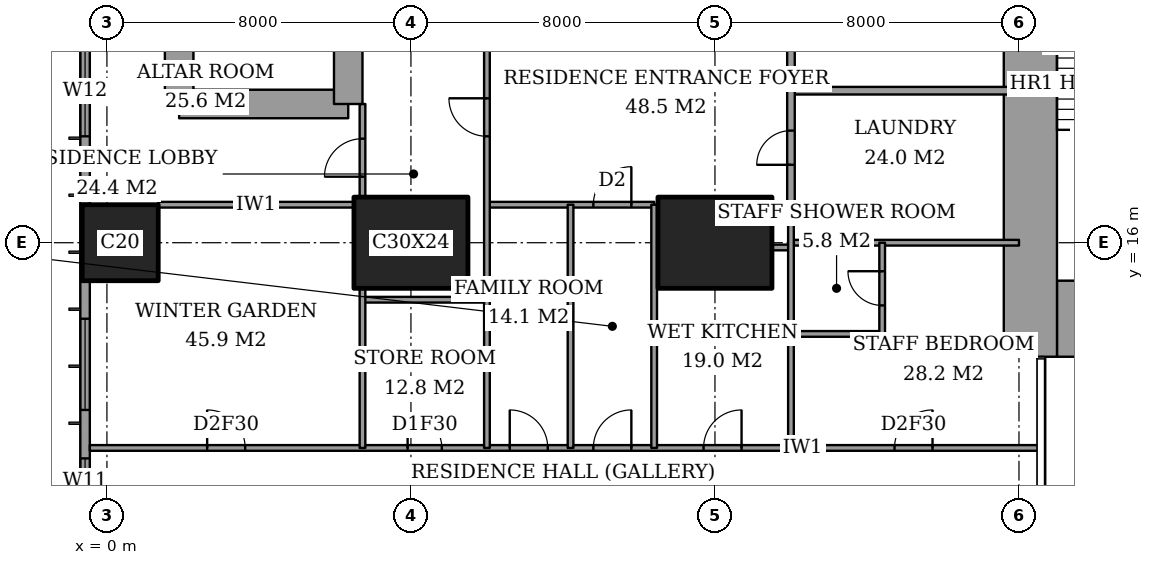
"""IFC4 building model, lengths in metres.
Left out: names, types, materials, properties, quantities, classifications, styles, units other than length and angle.
Written with IfcOpenShell. Run it as: python <this file> out.ifc"""

import sys

from ifc_helpers import new_model, si_unit, direction, frame, frame_2d, origin, origin_2d, place, context, subcontext, project, spatial, rectangle, extrude, element, fill, save


model = new_model("IFC4")
c1 = context("Model", 3, precision=1e-05, world=origin(), true_north=direction((0.0, 1.0)))
c2 = subcontext(c1, "Body", "Model", "MODEL_VIEW")
j1 = project(units=[si_unit("LENGTHUNIT", "METRE"), si_unit("PLANEANGLEUNIT", "RADIAN")], contexts=[c1])
p1 = place(None, origin())
s1 = spatial("IfcSite", under=j1, at=p1, CompositionType="ELEMENT")
p2 = place(p1, origin())
s2 = spatial("IfcBuilding", under=s1, at=p2, CompositionType="ELEMENT")
p3 = place(p2, frame((0.0, 0.0, 128.6)))
s3 = spatial("IfcBuildingStorey", under=s2, at=p3, CompositionType="ELEMENT", Elevation=128.6)
p4 = place(p3, frame((0.35, 16.0, 0.0), z_axis=(0.0, 0.0, 1.0), x_axis=(1.0, 0.0, 0.0)))
e1 = element("IfcColumn", 1, at=p4, inside=s3, PredefinedType="COLUMN", context=c2, shape_type="SweptSolid", body=[
    extrude(rectangle(XDim=2.0, YDim=2.0, at=origin_2d()), origin(), (0.0, 0.0, 1.0), 3.6),
])
for number, where, z_axis, x_axis in (
    (2, (8.0, 16.0, 0.0), (0.0, 0.0, 1.0), (1.0, 0.0, 0.0)),
    (3, (16.0, 16.0, 0.0), (0.0, 0.0, 1.0), (1.0, 0.0, 0.0)),
):
    element("IfcColumn", number, at=place(p3, frame(where, z_axis=z_axis, x_axis=x_axis)), inside=s3, PredefinedType="COLUMN", context=c2, shape_type="SweptSolid", body=[
        extrude(rectangle(XDim=3.0, YDim=2.4, at=origin_2d()), origin(), (0.0, 0.0, 1.0), 3.6),
    ])
p5 = place(p3, frame((25.0, 14.0, 0.0), z_axis=(0.0, 0.0, 1.0), x_axis=(1.0, 0.0, 0.0)))
e4 = element("IfcWall", 4, at=p5, inside=s3, PredefinedType="SHEAR", context=c2, shape_type="SweptSolid", body=[
    extrude(rectangle(XDim=3.15, YDim=2.0, at=frame_2d((1.575, 0.0))), origin(), (0.0, 0.0, 1.0), 3.6),
])
p6 = place(p3, frame((24.3, 13.0, 0.0), z_axis=(0.0, 0.0, 1.0), x_axis=(0.0, 1.0, 0.0)))
e5 = element("IfcWall", 5, at=p6, inside=s3, PredefinedType="SHEAR", context=c2, shape_type="SweptSolid", body=[
    extrude(rectangle(XDim=10.15, YDim=1.4, at=frame_2d((5.075, 0.0))), origin(), (0.0, 0.0, 1.0), 3.6),
])
p7 = place(p3, frame((1.9, 19.65, 0.0), z_axis=(0.0, 0.0, 1.0), x_axis=(1.0, 0.0, 0.0)))
e6 = element("IfcWall", 6, at=p7, inside=s3, PredefinedType="SHEAR", context=c2, shape_type="SweptSolid", body=[
    extrude(rectangle(XDim=4.45, YDim=0.75, at=frame_2d((2.225, 0.0))), origin(), (0.0, 0.0, 1.0), 3.6),
])
p8 = place(p3, frame((6.35, 19.65, 0.0), z_axis=(0.0, 0.0, 1.0), x_axis=(0.0, 1.0, 0.0)))
e7 = element("IfcWall", 7, at=p8, inside=s3, PredefinedType="SHEAR", context=c2, shape_type="SweptSolid", body=[
    extrude(rectangle(XDim=8.7, YDim=0.75, at=frame_2d((4.35, 0.0))), origin(), (0.0, 0.0, 1.0), 3.6),
])
p9 = place(p8, frame((6.725, 0.0, 0.0)))
e8 = element("IfcOpeningElement", 8, at=p9, cuts=e7, PredefinedType="OPENING", context=c2, shape_type="SweptSolid", body=[
    extrude(rectangle(XDim=1.0, YDim=2.1, at=frame_2d((0.5, 1.05))), frame((0.0, 0.385, 0.0), z_axis=(0.0, -1.0, 0.0), x_axis=(1.0, 0.0, 0.0)), (0.0, 0.0, 1.0), 0.77),
])
p10 = place(p3, frame((1.9, 28.35, 0.0), z_axis=(0.0, 0.0, 1.0), x_axis=(0.0, -1.0, 0.0)))
e9 = element("IfcWall", 9, at=p10, inside=s3, PredefinedType="SHEAR", context=c2, shape_type="SweptSolid", body=[
    extrude(rectangle(XDim=8.7, YDim=0.75, at=frame_2d((4.35, 0.0))), origin(), (0.0, 0.0, 1.0), 3.6),
])
p11 = place(p3, frame((-0.575, 44.825, 0.0), z_axis=(0.0, 0.0, 1.0), x_axis=(0.0, -1.0, 0.0)))
e10 = element("IfcWall", 10, at=p11, inside=s3, PredefinedType="SOLIDWALL", context=c2, shape_type="SweptSolid", body=[
    extrude(rectangle(XDim=41.65, YDim=0.25, at=frame_2d((20.825, 0.0))), origin(), (0.0, 0.0, 1.0), 3.6),
])
p12 = place(p11, frame((0.775, 0.0, 0.4)))
e11 = element("IfcOpeningElement", 11, at=p12, cuts=e10, PredefinedType="OPENING", context=c2, shape_type="SweptSolid", body=[
    extrude(rectangle(XDim=2.4, YDim=2.2, at=frame_2d((1.2, 1.1))), frame((0.0, 0.135, 0.0), z_axis=(0.0, -1.0, 0.0), x_axis=(1.0, 0.0, 0.0)), (0.0, 0.0, 1.0), 0.27),
])
p13 = place(p11, frame((6.2, 0.0, 0.4)))
e12 = element("IfcOpeningElement", 12, at=p13, cuts=e10, PredefinedType="OPENING", context=c2, shape_type="SweptSolid", body=[
    extrude(rectangle(XDim=1.2, YDim=2.2, at=frame_2d((0.6, 1.1))), frame((0.0, 0.135, 0.0), z_axis=(0.0, -1.0, 0.0), x_axis=(1.0, 0.0, 0.0)), (0.0, 0.0, 1.0), 0.27),
])
p14 = place(p11, frame((8.525, 0.0, 0.4)))
e13 = element("IfcOpeningElement", 13, at=p14, cuts=e10, PredefinedType="OPENING", context=c2, shape_type="SweptSolid", body=[
    extrude(rectangle(XDim=2.4, YDim=2.2, at=frame_2d((1.2, 1.1))), frame((0.0, 0.135, 0.0), z_axis=(0.0, -1.0, 0.0), x_axis=(1.0, 0.0, 0.0)), (0.0, 0.0, 1.0), 0.27),
])
p15 = place(p11, frame((15.625, 0.0, 0.4)))
e14 = element("IfcOpeningElement", 14, at=p15, cuts=e10, PredefinedType="OPENING", context=c2, shape_type="SweptSolid", body=[
    extrude(rectangle(XDim=2.4, YDim=2.2, at=frame_2d((1.2, 1.1))), frame((0.0, 0.135, 0.0), z_axis=(0.0, -1.0, 0.0), x_axis=(1.0, 0.0, 0.0)), (0.0, 0.0, 1.0), 0.27),
])
p16 = place(p11, frame((23.625, 0.0, 0.4)))
e15 = element("IfcOpeningElement", 15, at=p16, cuts=e10, PredefinedType="OPENING", context=c2, shape_type="SweptSolid", body=[
    extrude(rectangle(XDim=2.4, YDim=2.2, at=frame_2d((1.2, 1.1))), frame((0.0, 0.135, 0.0), z_axis=(0.0, -1.0, 0.0), x_axis=(1.0, 0.0, 0.0)), (0.0, 0.0, 1.0), 0.27),
])
p17 = place(p11, frame((30.825, 0.0, 0.4)))
e16 = element("IfcOpeningElement", 16, at=p17, cuts=e10, PredefinedType="OPENING", context=c2, shape_type="SweptSolid", body=[
    extrude(rectangle(XDim=2.4, YDim=2.2, at=frame_2d((1.2, 1.1))), frame((0.0, 0.135, 0.0), z_axis=(0.0, -1.0, 0.0), x_axis=(1.0, 0.0, 0.0)), (0.0, 0.0, 1.0), 0.27),
])
p18 = place(p11, frame((34.5, 0.0, 0.4)))
e17 = element("IfcOpeningElement", 17, at=p18, cuts=e10, PredefinedType="OPENING", context=c2, shape_type="SweptSolid", body=[
    extrude(rectangle(XDim=1.2, YDim=2.2, at=frame_2d((0.6, 1.1))), frame((0.0, 0.135, 0.0), z_axis=(0.0, -1.0, 0.0), x_axis=(1.0, 0.0, 0.0)), (0.0, 0.0, 1.0), 0.27),
])
p19 = place(p11, frame((38.475, 0.0, 0.4)))
e18 = element("IfcOpeningElement", 18, at=p19, cuts=e10, PredefinedType="OPENING", context=c2, shape_type="SweptSolid", body=[
    extrude(rectangle(XDim=2.4, YDim=2.2, at=frame_2d((1.2, 1.1))), frame((0.0, 0.135, 0.0), z_axis=(0.0, -1.0, 0.0), x_axis=(1.0, 0.0, 0.0)), (0.0, 0.0, 1.0), 0.27),
])
p20 = place(p3, frame((-0.45, 10.6, 0.0), z_axis=(0.0, 0.0, 1.0), x_axis=(1.0, 0.0, 0.0)))
e19 = element("IfcWall", 19, at=p20, inside=s3, PredefinedType="PARTITIONING", context=c2, shape_type="SweptSolid", body=[
    extrude(rectangle(XDim=25.011, YDim=0.15, at=frame_2d((12.505, 0.0))), origin(), (0.0, 0.0, 1.0), 3.35),
])
p21 = place(p20, frame((13.25, 0.0, 0.0)))
e20 = element("IfcOpeningElement", 20, at=p21, cuts=e19, PredefinedType="OPENING", context=c2, shape_type="SweptSolid", body=[
    extrude(rectangle(XDim=1.0, YDim=2.1, at=frame_2d((0.5, 1.05))), frame((0.0, 0.085, 0.0), z_axis=(0.0, -1.0, 0.0), x_axis=(1.0, 0.0, 0.0)), (0.0, 0.0, 1.0), 0.17),
])
p22 = place(p20, frame((3.087, 0.0, 0.0)))
e21 = element("IfcOpeningElement", 21, at=p22, cuts=e19, PredefinedType="OPENING", context=c2, shape_type="SweptSolid", body=[
    extrude(rectangle(XDim=1.0, YDim=2.1, at=frame_2d((0.5, 1.05))), frame((0.0, 0.085, 0.0), z_axis=(0.0, -1.0, 0.0), x_axis=(1.0, 0.0, 0.0)), (0.0, 0.0, 1.0), 0.17),
])
p23 = place(p20, frame((8.363, 0.0, 0.0)))
e22 = element("IfcOpeningElement", 22, at=p23, cuts=e19, PredefinedType="OPENING", context=c2, shape_type="SweptSolid", body=[
    extrude(rectangle(XDim=0.9, YDim=2.1, at=frame_2d((0.45, 1.05))), frame((0.0, 0.085, 0.0), z_axis=(0.0, -1.0, 0.0), x_axis=(1.0, 0.0, 0.0)), (0.0, 0.0, 1.0), 0.17),
])
p24 = place(p20, frame((11.05, 0.0, 0.0)))
e23 = element("IfcOpeningElement", 23, at=p24, cuts=e19, PredefinedType="OPENING", context=c2, shape_type="SweptSolid", body=[
    extrude(rectangle(XDim=1.0, YDim=2.1, at=frame_2d((0.5, 1.05))), frame((0.0, 0.085, 0.0), z_axis=(0.0, -1.0, 0.0), x_axis=(1.0, 0.0, 0.0)), (0.0, 0.0, 1.0), 0.17),
])
p25 = place(p20, frame((16.15, 0.0, 0.0)))
e24 = element("IfcOpeningElement", 24, at=p25, cuts=e19, PredefinedType="OPENING", context=c2, shape_type="SweptSolid", body=[
    extrude(rectangle(XDim=1.0, YDim=2.1, at=frame_2d((0.5, 1.05))), frame((0.0, 0.085, 0.0), z_axis=(0.0, -1.0, 0.0), x_axis=(1.0, 0.0, 0.0)), (0.0, 0.0, 1.0), 0.17),
])
p26 = place(p20, frame((21.175, 0.0, 0.0)))
e25 = element("IfcOpeningElement", 25, at=p26, cuts=e19, PredefinedType="OPENING", context=c2, shape_type="SweptSolid", body=[
    extrude(rectangle(XDim=1.0, YDim=2.1, at=frame_2d((0.5, 1.05))), frame((0.0, 0.085, 0.0), z_axis=(0.0, -1.0, 0.0), x_axis=(1.0, 0.0, 0.0)), (0.0, 0.0, 1.0), 0.17),
])
p27 = place(p3, frame((18.0, 13.6, 0.0), z_axis=(0.0, 0.0, 1.0), x_axis=(1.0, 0.0, 0.0)))
e26 = element("IfcWall", 26, at=p27, inside=s3, PredefinedType="PARTITIONING", context=c2, shape_type="SweptSolid", body=[
    extrude(rectangle(XDim=2.4, YDim=0.15, at=frame_2d((1.2, 0.0))), origin(), (0.0, 0.0, 1.0), 3.35),
])
p28 = place(p3, frame((6.725, 14.5, 0.0), z_axis=(0.0, 0.0, 1.0), x_axis=(1.0, 0.0, 0.0)))
e27 = element("IfcWall", 27, at=p28, inside=s3, PredefinedType="PARTITIONING", context=c2, shape_type="SweptSolid", body=[
    extrude(rectangle(XDim=3.275, YDim=0.15, at=frame_2d((1.637, 0.0))), origin(), (0.0, 0.0, 1.0), 3.35),
])
p29 = place(p3, frame((17.5, 15.875, 0.0), z_axis=(0.0, 0.0, 1.0), x_axis=(1.0, 0.0, 0.0)))
e28 = element("IfcWall", 28, at=p29, inside=s3, PredefinedType="PARTITIONING", context=c2, shape_type="SweptSolid", body=[
    extrude(rectangle(XDim=0.5, YDim=0.15, at=frame_2d((0.25, 0.0))), origin(), (0.0, 0.0, 1.0), 3.35),
])
p30 = place(p3, frame((18.0, 16.0, 0.0), z_axis=(0.0, 0.0, 1.0), x_axis=(1.0, 0.0, 0.0)))
e29 = element("IfcWall", 29, at=p30, inside=s3, PredefinedType="PARTITIONING", context=c2, shape_type="SweptSolid", body=[
    extrude(rectangle(XDim=6.0, YDim=0.15, at=frame_2d((3.0, 0.0))), origin(), (0.0, 0.0, 1.0), 3.35),
])
p31 = place(p3, frame((1.35, 17.0, 0.0), z_axis=(0.0, 0.0, 1.0), x_axis=(1.0, 0.0, 0.0)))
e30 = element("IfcWall", 30, at=p31, inside=s3, PredefinedType="PARTITIONING", context=c2, shape_type="SweptSolid", body=[
    extrude(rectangle(XDim=5.15, YDim=0.15, at=frame_2d((2.575, 0.0))), origin(), (0.0, 0.0, 1.0), 3.35),
])
p32 = place(p3, frame((10.0, 17.0, 0.0), z_axis=(0.0, 0.0, 1.0), x_axis=(1.0, 0.0, 0.0)))
e31 = element("IfcWall", 31, at=p32, inside=s3, PredefinedType="PARTITIONING", context=c2, shape_type="SweptSolid", body=[
    extrude(rectangle(XDim=4.4, YDim=0.15, at=frame_2d((2.2, 0.0))), origin(), (0.0, 0.0, 1.0), 3.35),
])
p33 = place(p32, frame((2.8, 0.0, 0.0)))
e32 = element("IfcOpeningElement", 32, at=p33, cuts=e31, PredefinedType="OPENING", context=c2, shape_type="SweptSolid", body=[
    extrude(rectangle(XDim=1.0, YDim=2.1, at=frame_2d((0.5, 1.05))), frame((0.0, 0.085, 0.0), z_axis=(0.0, -1.0, 0.0), x_axis=(1.0, 0.0, 0.0)), (0.0, 0.0, 1.0), 0.17),
])
p34 = place(p3, frame((18.0, 20.0, 0.0), z_axis=(0.0, 0.0, 1.0), x_axis=(1.0, 0.0, 0.0)))
e33 = element("IfcWall", 33, at=p34, inside=s3, PredefinedType="PARTITIONING", context=c2, shape_type="SweptSolid", body=[
    extrude(rectangle(XDim=6.0, YDim=0.2, at=frame_2d((3.0, 0.0))), origin(), (0.0, 0.0, 1.0), 3.35),
])
p35 = place(p3, frame((6.725, 10.6, 0.0), z_axis=(0.0, 0.0, 1.0), x_axis=(0.0, 1.0, 0.0)))
e34 = element("IfcWall", 34, at=p35, inside=s3, PredefinedType="PARTITIONING", context=c2, shape_type="SweptSolid", body=[
    extrude(rectangle(XDim=4.2, YDim=0.15, at=frame_2d((2.1, 0.0))), origin(), (0.0, 0.0, 1.0), 3.35),
])
p36 = place(p3, frame((6.725, 17.2, 0.0), z_axis=(0.0, 0.0, 1.0), x_axis=(0.0, 1.0, 0.0)))
e35 = element("IfcWall", 35, at=p36, inside=s3, PredefinedType="PARTITIONING", context=c2, shape_type="SweptSolid", body=[
    extrude(rectangle(XDim=2.45, YDim=0.15, at=frame_2d((1.225, 0.0))), origin(), (0.0, 0.0, 1.0), 3.35),
])
p37 = place(p36, frame((0.538, 0.0, 0.0)))
e36 = element("IfcOpeningElement", 36, at=p37, cuts=e35, PredefinedType="OPENING", context=c2, shape_type="SweptSolid", body=[
    extrude(rectangle(XDim=1.0, YDim=2.1, at=frame_2d((0.5, 1.05))), frame((0.0, 0.085, 0.0), z_axis=(0.0, -1.0, 0.0), x_axis=(1.0, 0.0, 0.0)), (0.0, 0.0, 1.0), 0.17),
])
p38 = place(p3, frame((10.0, 10.6, 0.0), z_axis=(0.0, 0.0, 1.0), x_axis=(0.0, 1.0, 0.0)))
e37 = element("IfcWall", 37, at=p38, inside=s3, PredefinedType="PARTITIONING", context=c2, shape_type="SweptSolid", body=[
    extrude(rectangle(XDim=11.0, YDim=0.15, at=frame_2d((5.5, 0.0))), origin(), (0.0, 0.0, 1.0), 3.35),
])
p39 = place(p38, frame((8.2, 0.0, 0.0)))
e38 = element("IfcOpeningElement", 38, at=p39, cuts=e37, PredefinedType="OPENING", context=c2, shape_type="SweptSolid", body=[
    extrude(rectangle(XDim=1.0, YDim=2.1, at=frame_2d((0.5, 1.05))), frame((0.0, 0.085, 0.0), z_axis=(0.0, -1.0, 0.0), x_axis=(1.0, 0.0, 0.0)), (0.0, 0.0, 1.0), 0.17),
])
for number, where, z_axis, x_axis in (
    (39, (12.2, 10.6, 0.0), (0.0, 0.0, 1.0), (0.0, 1.0, 0.0)),
    (40, (14.4, 10.6, 0.0), (0.0, 0.0, 1.0), (0.0, 1.0, 0.0)),
):
    element("IfcWall", number, at=place(p3, frame(where, z_axis=z_axis, x_axis=x_axis)), inside=s3, PredefinedType="PARTITIONING", context=c2, shape_type="SweptSolid", body=[
        extrude(rectangle(XDim=6.4, YDim=0.15, at=frame_2d((3.2, 0.0))), origin(), (0.0, 0.0, 1.0), 3.35),
    ])
p40 = place(p3, frame((18.0, 17.0, 0.0), z_axis=(0.0, 0.0, 1.0), x_axis=(0.0, 1.0, 0.0)))
e41 = element("IfcWall", 41, at=p40, inside=s3, PredefinedType="PARTITIONING", context=c2, shape_type="SweptSolid", body=[
    extrude(rectangle(XDim=7.0, YDim=0.2, at=frame_2d((3.5, 0.0))), origin(), (0.0, 0.0, 1.0), 3.35),
])
p41 = place(p40, frame((4.4, 0.0, 0.0)))
e42 = element("IfcOpeningElement", 42, at=p41, cuts=e41, PredefinedType="OPENING", context=c2, shape_type="SweptSolid", body=[
    extrude(rectangle(XDim=1.2, YDim=2.4, at=frame_2d((0.6, 1.2))), frame((0.0, 0.11, 0.0), z_axis=(0.0, -1.0, 0.0), x_axis=(1.0, 0.0, 0.0)), (0.0, 0.0, 1.0), 0.22),
])
p42 = place(p40, frame((1.05, 0.0, 0.0)))
e43 = element("IfcOpeningElement", 43, at=p42, cuts=e41, PredefinedType="OPENING", context=c2, shape_type="SweptSolid", body=[
    extrude(rectangle(XDim=0.9, YDim=2.1, at=frame_2d((0.45, 1.05))), frame((0.0, 0.11, 0.0), z_axis=(0.0, -1.0, 0.0), x_axis=(1.0, 0.0, 0.0)), (0.0, 0.0, 1.0), 0.22),
])
p43 = place(p3, frame((18.0, 10.6, 0.0), z_axis=(0.0, 0.0, 1.0), x_axis=(0.0, 1.0, 0.0)))
e44 = element("IfcWall", 44, at=p43, inside=s3, PredefinedType="PARTITIONING", context=c2, shape_type="SweptSolid", body=[
    extrude(rectangle(XDim=6.4, YDim=0.15, at=frame_2d((3.2, 0.0))), origin(), (0.0, 0.0, 1.0), 3.35),
])
p44 = place(p3, frame((20.4, 13.6, 0.0), z_axis=(0.0, 0.0, 1.0), x_axis=(0.0, 1.0, 0.0)))
e45 = element("IfcWall", 45, at=p44, inside=s3, PredefinedType="PARTITIONING", context=c2, shape_type="SweptSolid", body=[
    extrude(rectangle(XDim=2.4, YDim=0.15, at=frame_2d((1.2, 0.0))), origin(), (0.0, 0.0, 1.0), 3.35),
])
p45 = place(p44, frame((0.75, 0.0, 0.0)))
e46 = element("IfcOpeningElement", 46, at=p45, cuts=e45, PredefinedType="OPENING", context=c2, shape_type="SweptSolid", body=[
    extrude(rectangle(XDim=0.9, YDim=2.1, at=frame_2d((0.45, 1.05))), frame((0.0, 0.085, 0.0), z_axis=(0.0, -1.0, 0.0), x_axis=(1.0, 0.0, 0.0)), (0.0, 0.0, 1.0), 0.17),
])
p46 = place(p16, origin())
e47 = element("IfcWindow", 47, at=p46, inside=s3, PartitioningType="SINGLE_PANEL", PredefinedType="WINDOW", context=c2, shape_type="SweptSolid", body=[
    extrude(rectangle(XDim=2.4, YDim=2.2, at=frame_2d((1.2, 1.1))), frame((0.0, 0.03, 0.0), z_axis=(0.0, -1.0, 0.0), x_axis=(1.0, 0.0, 0.0)), (0.0, 0.0, 1.0), 0.06),
])
fill(e15, e47)
p47 = place(p17, origin())
e48 = element("IfcWindow", 48, at=p47, inside=s3, PartitioningType="SINGLE_PANEL", PredefinedType="WINDOW", context=c2, shape_type="SweptSolid", body=[
    extrude(rectangle(XDim=2.4, YDim=2.2, at=frame_2d((1.2, 1.1))), frame((0.0, 0.03, 0.0), z_axis=(0.0, -1.0, 0.0), x_axis=(1.0, 0.0, 0.0)), (0.0, 0.0, 1.0), 0.06),
])
fill(e16, e48)
p48 = place(p18, origin())
e49 = element("IfcWindow", 49, at=p48, inside=s3, PartitioningType="SINGLE_PANEL", PredefinedType="WINDOW", context=c2, shape_type="SweptSolid", body=[
    extrude(rectangle(XDim=1.2, YDim=2.2, at=frame_2d((0.6, 1.1))), frame((0.0, 0.03, 0.0), z_axis=(0.0, -1.0, 0.0), x_axis=(1.0, 0.0, 0.0)), (0.0, 0.0, 1.0), 0.06),
])
fill(e17, e49)
p49 = place(p21, origin())
e50 = element("IfcDoor", 50, at=p49, inside=s3, OperationType="SINGLE_SWING_LEFT", PredefinedType="DOOR", context=c2, shape_type="SweptSolid", body=[
    extrude(rectangle(XDim=1.0, YDim=2.1, at=frame_2d((0.5, 1.05))), frame((0.0, 0.025, 0.0), z_axis=(0.0, -1.0, 0.0), x_axis=(1.0, 0.0, 0.0)), (0.0, 0.0, 1.0), 0.05),
])
fill(e20, e50)
p50 = place(p22, origin())
e51 = element("IfcDoor", 51, at=p50, inside=s3, OperationType="SINGLE_SWING_RIGHT", PredefinedType="DOOR", context=c2, shape_type="SweptSolid", body=[
    extrude(rectangle(XDim=1.0, YDim=2.1, at=frame_2d((0.5, 1.05))), frame((0.0, 0.025, 0.0), z_axis=(0.0, -1.0, 0.0), x_axis=(1.0, 0.0, 0.0)), (0.0, 0.0, 1.0), 0.05),
])
fill(e21, e51)
p51 = place(p37, origin())
e52 = element("IfcDoor", 52, at=p51, inside=s3, OperationType="SINGLE_SWING_RIGHT", PredefinedType="DOOR", context=c2, shape_type="SweptSolid", body=[
    extrude(rectangle(XDim=1.0, YDim=2.1, at=frame_2d((0.5, 1.05))), frame((0.0, 0.025, 0.0), z_axis=(0.0, -1.0, 0.0), x_axis=(1.0, 0.0, 0.0)), (0.0, 0.0, 1.0), 0.05),
])
fill(e36, e52)
p52 = place(p23, origin())
e53 = element("IfcDoor", 53, at=p52, inside=s3, OperationType="SINGLE_SWING_RIGHT", PredefinedType="DOOR", context=c2, shape_type="SweptSolid", body=[
    extrude(rectangle(XDim=0.9, YDim=2.1, at=frame_2d((0.45, 1.05))), frame((0.0, 0.025, 0.0), z_axis=(0.0, -1.0, 0.0), x_axis=(1.0, 0.0, 0.0)), (0.0, 0.0, 1.0), 0.05),
])
fill(e22, e53)
p53 = place(p39, origin())
e54 = element("IfcDoor", 54, at=p53, inside=s3, OperationType="SINGLE_SWING_LEFT", PredefinedType="DOOR", context=c2, shape_type="SweptSolid", body=[
    extrude(rectangle(XDim=1.0, YDim=2.1, at=frame_2d((0.5, 1.05))), frame((0.0, 0.025, 0.0), z_axis=(0.0, -1.0, 0.0), x_axis=(1.0, 0.0, 0.0)), (0.0, 0.0, 1.0), 0.05),
])
fill(e38, e54)
p54 = place(p24, origin())
e55 = element("IfcDoor", 55, at=p54, inside=s3, OperationType="SINGLE_SWING_RIGHT", PredefinedType="DOOR", context=c2, shape_type="SweptSolid", body=[
    extrude(rectangle(XDim=1.0, YDim=2.1, at=frame_2d((0.5, 1.05))), frame((0.0, 0.025, 0.0), z_axis=(0.0, -1.0, 0.0), x_axis=(1.0, 0.0, 0.0)), (0.0, 0.0, 1.0), 0.05),
])
fill(e23, e55)
p55 = place(p33, origin())
e56 = element("IfcDoor", 56, at=p55, inside=s3, OperationType="SINGLE_SWING_LEFT", PredefinedType="DOOR", context=c2, shape_type="SweptSolid", body=[
    extrude(rectangle(XDim=1.0, YDim=2.1, at=frame_2d((0.5, 1.05))), frame((0.0, 0.025, 0.0), z_axis=(0.0, -1.0, 0.0), x_axis=(1.0, 0.0, 0.0)), (0.0, 0.0, 1.0), 0.05),
])
fill(e32, e56)
p56 = place(p25, origin())
e57 = element("IfcDoor", 57, at=p56, inside=s3, OperationType="SINGLE_SWING_LEFT", PredefinedType="DOOR", context=c2, shape_type="SweptSolid", body=[
    extrude(rectangle(XDim=1.0, YDim=2.1, at=frame_2d((0.5, 1.05))), frame((0.0, 0.025, 0.0), z_axis=(0.0, -1.0, 0.0), x_axis=(1.0, 0.0, 0.0)), (0.0, 0.0, 1.0), 0.05),
])
fill(e24, e57)
p57 = place(p45, origin())
e58 = element("IfcDoor", 58, at=p57, inside=s3, OperationType="SINGLE_SWING_LEFT", PredefinedType="DOOR", context=c2, shape_type="SweptSolid", body=[
    extrude(rectangle(XDim=0.9, YDim=2.1, at=frame_2d((0.45, 1.05))), frame((0.0, 0.025, 0.0), z_axis=(0.0, -1.0, 0.0), x_axis=(1.0, 0.0, 0.0)), (0.0, 0.0, 1.0), 0.05),
])
fill(e46, e58)
p58 = place(p26, origin())
e59 = element("IfcDoor", 59, at=p58, inside=s3, OperationType="SINGLE_SWING_LEFT", PredefinedType="DOOR", context=c2, shape_type="SweptSolid", body=[
    extrude(rectangle(XDim=1.0, YDim=2.1, at=frame_2d((0.5, 1.05))), frame((0.0, 0.025, 0.0), z_axis=(0.0, -1.0, 0.0), x_axis=(1.0, 0.0, 0.0)), (0.0, 0.0, 1.0), 0.05),
])
fill(e25, e59)
p59 = place(p42, origin())
e60 = element("IfcDoor", 60, at=p59, inside=s3, OperationType="SINGLE_SWING_RIGHT", PredefinedType="DOOR", context=c2, shape_type="SweptSolid", body=[
    extrude(rectangle(XDim=0.9, YDim=2.1, at=frame_2d((0.45, 1.05))), frame((0.0, 0.025, 0.0), z_axis=(0.0, -1.0, 0.0), x_axis=(1.0, 0.0, 0.0)), (0.0, 0.0, 1.0), 0.05),
])
fill(e43, e60)
save(model, sys.argv[1])
